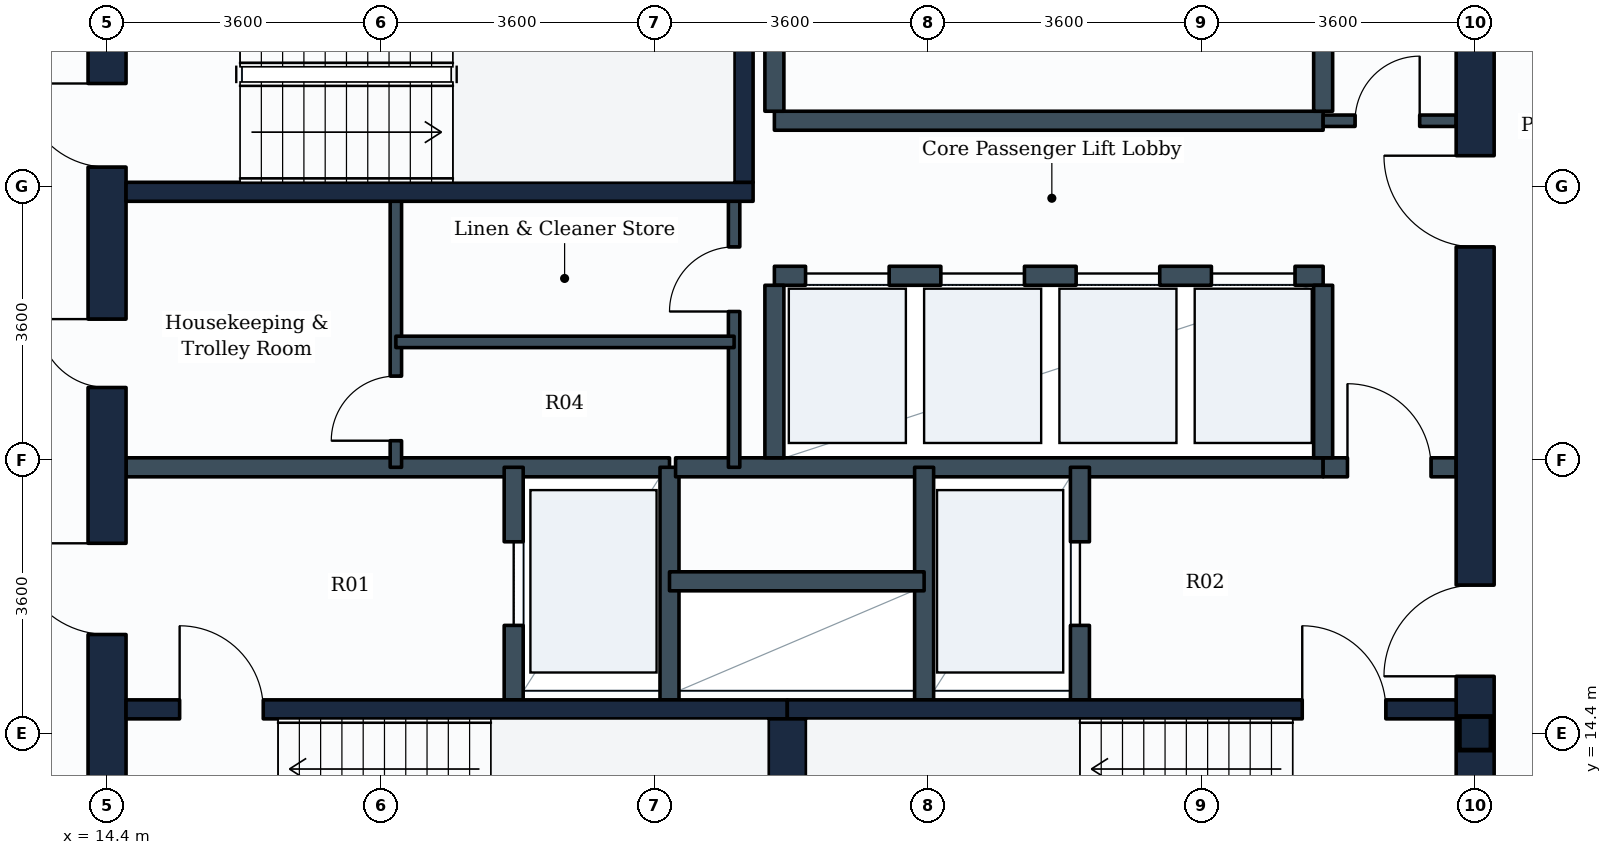
"""IFC4 building model, lengths in metres.
Left out: names, types, materials, properties, quantities, classifications, styles, units other than length and angle.
Written with IfcOpenShell. Run it as: python <this file> out.ifc"""

import sys

from ifc_helpers import new_model, si_unit, direction, frame, frame_2d, origin, origin_2d, place, context, subcontext, project, spatial, rectangle, i_section, extrude, element, fill, save


model = new_model("IFC4")
c1 = context("Model", 3, precision=1e-05, world=origin(), true_north=direction((0.0, 1.0)))
c2 = subcontext(c1, "Body", "Model", "MODEL_VIEW")
j1 = project(units=[si_unit("LENGTHUNIT", "METRE"), si_unit("PLANEANGLEUNIT", "RADIAN")], contexts=[c1])
p1 = place(None, origin())
s1 = spatial("IfcSite", under=j1, at=p1, CompositionType="ELEMENT")
p2 = place(p1, origin())
s2 = spatial("IfcBuilding", under=s1, at=p2, CompositionType="ELEMENT")
p3 = place(p2, frame((0.0, 0.0, 197.6)))
s3 = spatial("IfcBuildingStorey", under=s2, at=p3, CompositionType="ELEMENT", Elevation=197.6)
p4 = place(p3, frame((32.4, 14.4, 0.0), z_axis=(0.0, 0.0, 1.0), x_axis=(1.0, 0.0, 0.0)))
e1 = element("IfcColumn", 1, at=p4, inside=s3, PredefinedType="COLUMN", context=c2, shape_type="SweptSolid", body=[
    extrude(i_section(OverallWidth=0.416, OverallDepth=0.442, WebThickness=0.025, FlangeThickness=0.041, FilletRadius=0.015, at=origin_2d()), origin(), (0.0, 0.0, 1.0), 3.8),
])
p5 = place(p3, frame((14.4, 10.8, 0.0), z_axis=(0.0, 0.0, 1.0), x_axis=(0.0, 1.0, 0.0)))
e2 = element("IfcWall", 2, at=p5, inside=s3, PredefinedType="SHEAR", context=c2, shape_type="SweptSolid", body=[
    extrude(rectangle(XDim=14.4, YDim=0.5, at=frame_2d((7.2, 0.0))), origin(), (0.0, 0.0, 1.0), 3.55),
])
p6 = place(p5, frame((11.05, 0.0, 0.0)))
e3 = element("IfcOpeningElement", 3, at=p6, cuts=e2, PredefinedType="OPENING", context=c2, shape_type="SweptSolid", body=[
    extrude(rectangle(XDim=1.1, YDim=2.1, at=frame_2d((0.55, 1.05))), frame((0.0, 0.26, 0.0), z_axis=(0.0, -1.0, 0.0), x_axis=(1.0, 0.0, 0.0)), (0.0, 0.0, 1.0), 0.52),
])
p7 = place(p5, frame((4.9, 0.0, 0.0)))
e4 = element("IfcOpeningElement", 4, at=p7, cuts=e2, PredefinedType="OPENING", context=c2, shape_type="SweptSolid", body=[
    extrude(rectangle(XDim=1.2, YDim=2.1, at=frame_2d((0.6, 1.05))), frame((0.0, 0.26, 0.0), z_axis=(0.0, -1.0, 0.0), x_axis=(1.0, 0.0, 0.0)), (0.0, 0.0, 1.0), 0.52),
])
p8 = place(p5, frame((8.15, 0.0, 0.0)))
e5 = element("IfcOpeningElement", 5, at=p8, cuts=e2, PredefinedType="OPENING", context=c2, shape_type="SweptSolid", body=[
    extrude(rectangle(XDim=0.9, YDim=2.1, at=frame_2d((0.45, 1.05))), frame((0.0, 0.26, 0.0), z_axis=(0.0, -1.0, 0.0), x_axis=(1.0, 0.0, 0.0)), (0.0, 0.0, 1.0), 0.52),
])
p9 = place(p3, frame((32.4, 10.8, 0.0), z_axis=(0.0, 0.0, 1.0), x_axis=(0.0, 1.0, 0.0)))
e6 = element("IfcWall", 6, at=p9, inside=s3, PredefinedType="SHEAR", context=c2, shape_type="SweptSolid", body=[
    extrude(rectangle(XDim=14.4, YDim=0.5, at=frame_2d((7.2, 0.0))), origin(), (0.0, 0.0, 1.0), 3.55),
])
p10 = place(p9, frame((4.35, 0.0, 0.0)))
e7 = element("IfcOpeningElement", 7, at=p10, cuts=e6, PredefinedType="OPENING", context=c2, shape_type="SweptSolid", body=[
    extrude(rectangle(XDim=1.2, YDim=2.1, at=frame_2d((0.6, 1.05))), frame((0.0, 0.26, 0.0), z_axis=(0.0, -1.0, 0.0), x_axis=(1.0, 0.0, 0.0)), (0.0, 0.0, 1.0), 0.52),
])
p11 = place(p9, frame((10.0, 0.0, 0.0)))
e8 = element("IfcOpeningElement", 8, at=p11, cuts=e6, PredefinedType="OPENING", context=c2, shape_type="SweptSolid", body=[
    extrude(rectangle(XDim=1.2, YDim=2.1, at=frame_2d((0.6, 1.05))), frame((0.0, 0.26, 0.0), z_axis=(0.0, -1.0, 0.0), x_axis=(1.0, 0.0, 0.0)), (0.0, 0.0, 1.0), 0.52),
])
p12 = place(p3, frame((14.65, 14.715, 0.0), z_axis=(0.0, 0.0, 1.0), x_axis=(1.0, 0.0, 0.0)))
e9 = element("IfcWall", 9, at=p12, inside=s3, PredefinedType="SHEAR", context=c2, shape_type="SweptSolid", body=[
    extrude(rectangle(XDim=8.7, YDim=0.25, at=frame_2d((4.35, 0.0))), origin(), (0.0, 0.0, 1.0), 3.55),
])
p13 = place(p12, frame((0.705, 0.0, 0.0)))
e10 = element("IfcOpeningElement", 10, at=p13, cuts=e9, PredefinedType="OPENING", context=c2, shape_type="SweptSolid", body=[
    extrude(rectangle(XDim=1.1, YDim=2.1, at=frame_2d((0.55, 1.05))), frame((0.0, 0.135, 0.0), z_axis=(0.0, -1.0, 0.0), x_axis=(1.0, 0.0, 0.0)), (0.0, 0.0, 1.0), 0.27),
])
p14 = place(p3, frame((23.35, 14.715, 0.0), z_axis=(0.0, 0.0, 1.0), x_axis=(1.0, 0.0, 0.0)))
e11 = element("IfcWall", 11, at=p14, inside=s3, PredefinedType="SHEAR", context=c2, shape_type="SweptSolid", body=[
    extrude(rectangle(XDim=8.8, YDim=0.25, at=frame_2d((4.4, 0.0))), origin(), (0.0, 0.0, 1.0), 3.55),
])
p15 = place(p14, frame((6.775, 0.0, 0.0)))
e12 = element("IfcOpeningElement", 12, at=p15, cuts=e11, PredefinedType="OPENING", context=c2, shape_type="SweptSolid", body=[
    extrude(rectangle(XDim=1.1, YDim=2.1, at=frame_2d((0.55, 1.05))), frame((0.0, 0.135, 0.0), z_axis=(0.0, -1.0, 0.0), x_axis=(1.0, 0.0, 0.0)), (0.0, 0.0, 1.0), 0.27),
])
p16 = place(p3, frame((23.35, 11.75, 0.0), z_axis=(0.0, 0.0, 1.0), x_axis=(0.0, 1.0, 0.0)))
e13 = element("IfcWall", 13, at=p16, inside=s3, PredefinedType="SHEAR", context=c2, shape_type="SweptSolid", body=[
    extrude(rectangle(XDim=2.84, YDim=0.5, at=frame_2d((1.42, 0.0))), origin(), (0.0, 0.0, 1.0), 3.55),
])
p17 = place(p3, frame((14.65, 21.525, 0.0), z_axis=(0.0, 0.0, 1.0), x_axis=(1.0, 0.0, 0.0)))
e14 = element("IfcWall", 14, at=p17, inside=s3, PredefinedType="SHEAR", context=c2, shape_type="SweptSolid", body=[
    extrude(rectangle(XDim=8.25, YDim=0.25, at=frame_2d((4.125, 0.0))), origin(), (0.0, 0.0, 1.0), 3.55),
])
p18 = place(p3, frame((22.775, 21.65, 0.0), z_axis=(0.0, 0.0, 1.0), x_axis=(0.0, 1.0, 0.0)))
e15 = element("IfcWall", 15, at=p18, inside=s3, PredefinedType="SHEAR", context=c2, shape_type="SweptSolid", body=[
    extrude(rectangle(XDim=2.84, YDim=0.25, at=frame_2d((1.42, 0.0))), origin(), (0.0, 0.0, 1.0), 3.55),
])
p19 = place(p3, frame((14.65, 17.9, 0.0), z_axis=(0.0, 0.0, 1.0), x_axis=(1.0, 0.0, 0.0)))
e16 = element("IfcWall", 16, at=p19, inside=s3, PredefinedType="PARTITIONING", context=c2, shape_type="SweptSolid", body=[
    extrude(rectangle(XDim=7.15, YDim=0.25, at=frame_2d((3.575, 0.0))), origin(), (0.0, 0.0, 1.0), 3.535),
])
p20 = place(p3, frame((19.75, 14.84, 0.0), z_axis=(0.0, 0.0, 1.0), x_axis=(0.0, 1.0, 0.0)))
e17 = element("IfcWall", 17, at=p20, inside=s3, PredefinedType="PARTITIONING", context=c2, shape_type="SweptSolid", body=[
    extrude(rectangle(XDim=3.06, YDim=0.25, at=frame_2d((1.53, 0.0))), origin(), (0.0, 0.0, 1.0), 3.535),
])
p21 = place(p20, frame((0.98, 0.0, 0.0)))
e18 = element("IfcOpeningElement", 18, at=p21, cuts=e17, PredefinedType="OPENING", context=c2, shape_type="SweptSolid", body=[
    extrude(rectangle(XDim=1.1, YDim=2.1, at=frame_2d((0.55, 1.05))), frame((0.0, 0.135, 0.0), z_axis=(0.0, -1.0, 0.0), x_axis=(1.0, 0.0, 0.0)), (0.0, 0.0, 1.0), 0.27),
])
p22 = place(p3, frame((21.8, 14.84, 0.0), z_axis=(0.0, 0.0, 1.0), x_axis=(0.0, 1.0, 0.0)))
e19 = element("IfcWall", 19, at=p22, inside=s3, PredefinedType="PARTITIONING", context=c2, shape_type="SweptSolid", body=[
    extrude(rectangle(XDim=3.06, YDim=0.25, at=frame_2d((1.53, 0.0))), origin(), (0.0, 0.0, 1.0), 3.535),
])
p23 = place(p3, frame((21.88, 17.9, 0.0), z_axis=(0.0, 0.0, 1.0), x_axis=(1.0, 0.0, 0.0)))
e20 = element("IfcWall", 20, at=p23, inside=s3, PredefinedType="PARTITIONING", context=c2, shape_type="SweptSolid", body=[
    extrude(rectangle(XDim=8.52, YDim=0.25, at=frame_2d((4.26, 0.0))), origin(), (0.0, 0.0, 1.0), 3.535),
])
p24 = place(p3, frame((30.4, 17.9, 0.0), z_axis=(0.0, 0.0, 1.0), x_axis=(1.0, 0.0, 0.0)))
e21 = element("IfcWall", 21, at=p24, inside=s3, PredefinedType="PARTITIONING", context=c2, shape_type="SweptSolid", body=[
    extrude(rectangle(XDim=1.75, YDim=0.25, at=frame_2d((0.875, 0.0))), origin(), (0.0, 0.0, 1.0), 3.535),
])
p25 = place(p24, frame((0.32, 0.0, 0.0)))
e22 = element("IfcOpeningElement", 22, at=p25, cuts=e21, PredefinedType="OPENING", context=c2, shape_type="SweptSolid", body=[
    extrude(rectangle(XDim=1.1, YDim=2.1, at=frame_2d((0.55, 1.05))), frame((0.0, 0.135, 0.0), z_axis=(0.0, -1.0, 0.0), x_axis=(1.0, 0.0, 0.0)), (0.0, 0.0, 1.0), 0.27),
])
p26 = place(p3, frame((25.15, 14.84, 0.0), z_axis=(0.0, 0.0, 1.0), x_axis=(0.0, 1.0, 0.0)))
e23 = element("IfcWall", 23, at=p26, inside=s3, PredefinedType="PARTITIONING", context=c2, shape_type="SweptSolid", body=[
    extrude(rectangle(XDim=3.06, YDim=0.25, at=frame_2d((1.53, 0.0))), origin(), (0.0, 0.0, 1.0), 3.535),
])
p27 = place(p3, frame((27.2, 14.84, 0.0), z_axis=(0.0, 0.0, 1.0), x_axis=(0.0, 1.0, 0.0)))
e24 = element("IfcWall", 24, at=p27, inside=s3, PredefinedType="PARTITIONING", context=c2, shape_type="SweptSolid", body=[
    extrude(rectangle(XDim=3.06, YDim=0.25, at=frame_2d((1.53, 0.0))), origin(), (0.0, 0.0, 1.0), 3.535),
])
p28 = place(p27, frame((0.98, 0.0, 0.0)))
e25 = element("IfcOpeningElement", 25, at=p28, cuts=e24, PredefinedType="OPENING", context=c2, shape_type="SweptSolid", body=[
    extrude(rectangle(XDim=1.1, YDim=2.1, at=frame_2d((0.55, 1.05))), frame((0.0, 0.135, 0.0), z_axis=(0.0, -1.0, 0.0), x_axis=(1.0, 0.0, 0.0)), (0.0, 0.0, 1.0), 0.27),
])
p29 = place(p3, frame((21.8, 16.4, 0.0), z_axis=(0.0, 0.0, 1.0), x_axis=(1.0, 0.0, 0.0)))
e26 = element("IfcWall", 26, at=p29, inside=s3, PredefinedType="PARTITIONING", context=c2, shape_type="SweptSolid", body=[
    extrude(rectangle(XDim=3.35, YDim=0.25, at=frame_2d((1.675, 0.0))), origin(), (0.0, 0.0, 1.0), 3.535),
])
p30 = place(p3, frame((23.18, 20.42, 0.0), z_axis=(0.0, 0.0, 1.0), x_axis=(1.0, 0.0, 0.0)))
e27 = element("IfcWall", 27, at=p30, inside=s3, PredefinedType="PARTITIONING", context=c2, shape_type="SweptSolid", body=[
    extrude(rectangle(XDim=7.22, YDim=0.25, at=frame_2d((3.61, 0.0))), origin(), (0.0, 0.0, 1.0), 3.535),
])
p31 = place(p30, frame((0.41, 0.0, 0.0)))
e28 = element("IfcOpeningElement", 28, at=p31, cuts=e27, PredefinedType="OPENING", context=c2, shape_type="SweptSolid", body=[
    extrude(rectangle(XDim=1.1, YDim=2.1, at=frame_2d((0.55, 1.05))), frame((0.0, 0.135, 0.0), z_axis=(0.0, -1.0, 0.0), x_axis=(1.0, 0.0, 0.0)), (0.0, 0.0, 1.0), 0.27),
])
p32 = place(p30, frame((2.19, 0.0, 0.0)))
e29 = element("IfcOpeningElement", 29, at=p32, cuts=e27, PredefinedType="OPENING", context=c2, shape_type="SweptSolid", body=[
    extrude(rectangle(XDim=1.1, YDim=2.1, at=frame_2d((0.55, 1.05))), frame((0.0, 0.135, 0.0), z_axis=(0.0, -1.0, 0.0), x_axis=(1.0, 0.0, 0.0)), (0.0, 0.0, 1.0), 0.27),
])
p33 = place(p30, frame((3.97, 0.0, 0.0)))
e30 = element("IfcOpeningElement", 30, at=p33, cuts=e27, PredefinedType="OPENING", context=c2, shape_type="SweptSolid", body=[
    extrude(rectangle(XDim=1.1, YDim=2.1, at=frame_2d((0.55, 1.05))), frame((0.0, 0.135, 0.0), z_axis=(0.0, -1.0, 0.0), x_axis=(1.0, 0.0, 0.0)), (0.0, 0.0, 1.0), 0.27),
])
p34 = place(p30, frame((5.75, 0.0, 0.0)))
e31 = element("IfcOpeningElement", 31, at=p34, cuts=e27, PredefinedType="OPENING", context=c2, shape_type="SweptSolid", body=[
    extrude(rectangle(XDim=1.1, YDim=2.1, at=frame_2d((0.55, 1.05))), frame((0.0, 0.135, 0.0), z_axis=(0.0, -1.0, 0.0), x_axis=(1.0, 0.0, 0.0)), (0.0, 0.0, 1.0), 0.27),
])
for number, where, z_axis, x_axis in (
    (32, (23.18, 18.025, 0.0), (0.0, 0.0, 1.0), (0.0, 1.0, 0.0)),
    (33, (30.4, 18.025, 0.0), (0.0, 0.0, 1.0), (0.0, 1.0, 0.0)),
):
    element("IfcWall", number, at=place(p3, frame(where, z_axis=z_axis, x_axis=x_axis)), inside=s3, PredefinedType="PARTITIONING", context=c2, shape_type="SweptSolid", body=[
        extrude(rectangle(XDim=2.27, YDim=0.25, at=frame_2d((1.135, 0.0))), origin(), (0.0, 0.0, 1.0), 3.535),
    ])
p35 = place(p3, frame((23.18, 22.46, 0.0), z_axis=(0.0, 0.0, 1.0), x_axis=(1.0, 0.0, 0.0)))
e34 = element("IfcWall", 34, at=p35, inside=s3, PredefinedType="PARTITIONING", context=c2, shape_type="SweptSolid", body=[
    extrude(rectangle(XDim=7.22, YDim=0.25, at=frame_2d((3.61, 0.0))), origin(), (0.0, 0.0, 1.0), 3.535),
])
for number, where, z_axis, x_axis in (
    (35, (23.18, 22.585, 0.0), (0.0, 0.0, 1.0), (0.0, 1.0, 0.0)),
    (36, (30.4, 22.585, 0.0), (0.0, 0.0, 1.0), (0.0, 1.0, 0.0)),
):
    element("IfcWall", number, at=place(p3, frame(where, z_axis=z_axis, x_axis=x_axis)), inside=s3, PredefinedType="PARTITIONING", context=c2, shape_type="SweptSolid", body=[
        extrude(rectangle(XDim=2.315, YDim=0.25, at=frame_2d((1.157, 0.0))), origin(), (0.0, 0.0, 1.0), 3.535),
    ])
p36 = place(p3, frame((22.65, 17.9, 0.0), z_axis=(0.0, 0.0, 1.0), x_axis=(0.0, 1.0, 0.0)))
e37 = element("IfcWall", 37, at=p36, inside=s3, PredefinedType="PARTITIONING", context=c2, shape_type="SweptSolid", body=[
    extrude(rectangle(XDim=3.625, YDim=0.15, at=frame_2d((1.812, 0.0))), origin(), (0.0, 0.0, 1.0), 3.535),
])
p37 = place(p36, frame((2.05, 0.0, 0.0)))
e38 = element("IfcOpeningElement", 38, at=p37, cuts=e37, PredefinedType="OPENING", context=c2, shape_type="SweptSolid", body=[
    extrude(rectangle(XDim=0.85, YDim=2.1, at=frame_2d((0.425, 1.05))), frame((0.0, 0.085, 0.0), z_axis=(0.0, -1.0, 0.0), x_axis=(1.0, 0.0, 0.0)), (0.0, 0.0, 1.0), 0.17),
])
p38 = place(p3, frame((18.2, 17.9, 0.0), z_axis=(0.0, 0.0, 1.0), x_axis=(0.0, 1.0, 0.0)))
e39 = element("IfcWall", 39, at=p38, inside=s3, PredefinedType="PARTITIONING", context=c2, shape_type="SweptSolid", body=[
    extrude(rectangle(XDim=3.625, YDim=0.15, at=frame_2d((1.812, 0.0))), origin(), (0.0, 0.0, 1.0), 3.535),
])
p39 = place(p38, frame((0.35, 0.0, 0.0)))
e40 = element("IfcOpeningElement", 40, at=p39, cuts=e39, PredefinedType="OPENING", context=c2, shape_type="SweptSolid", body=[
    extrude(rectangle(XDim=0.85, YDim=2.1, at=frame_2d((0.425, 1.05))), frame((0.0, 0.085, 0.0), z_axis=(0.0, -1.0, 0.0), x_axis=(1.0, 0.0, 0.0)), (0.0, 0.0, 1.0), 0.17),
])
p40 = place(p3, frame((18.2, 19.55, 0.0), z_axis=(0.0, 0.0, 1.0), x_axis=(1.0, 0.0, 0.0)))
e41 = element("IfcWall", 41, at=p40, inside=s3, PredefinedType="PARTITIONING", context=c2, shape_type="SweptSolid", body=[
    extrude(rectangle(XDim=4.45, YDim=0.15, at=frame_2d((2.225, 0.0))), origin(), (0.0, 0.0, 1.0), 3.535),
])
p41 = place(p3, frame((30.4, 22.46, 0.0), z_axis=(0.0, 0.0, 1.0), x_axis=(1.0, 0.0, 0.0)))
e42 = element("IfcWall", 42, at=p41, inside=s3, PredefinedType="PARTITIONING", context=c2, shape_type="SweptSolid", body=[
    extrude(rectangle(XDim=1.75, YDim=0.15, at=frame_2d((0.875, 0.0))), origin(), (0.0, 0.0, 1.0), 3.535),
])
p42 = place(p41, frame((0.42, 0.0, 0.0)))
e43 = element("IfcOpeningElement", 43, at=p42, cuts=e42, PredefinedType="OPENING", context=c2, shape_type="SweptSolid", body=[
    extrude(rectangle(XDim=0.85, YDim=2.1, at=frame_2d((0.425, 1.05))), frame((0.0, 0.085, 0.0), z_axis=(0.0, -1.0, 0.0), x_axis=(1.0, 0.0, 0.0)), (0.0, 0.0, 1.0), 0.17),
])
p43 = place(p13, origin())
e44 = element("IfcDoor", 44, at=p43, inside=s3, OperationType="SINGLE_SWING_LEFT", PredefinedType="DOOR", context=c2, shape_type="SweptSolid", body=[
    extrude(rectangle(XDim=1.1, YDim=2.1, at=frame_2d((0.55, 1.05))), frame((0.0, 0.025, 0.0), z_axis=(0.0, -1.0, 0.0), x_axis=(1.0, 0.0, 0.0)), (0.0, 0.0, 1.0), 0.05),
])
fill(e10, e44)
p44 = place(p15, origin())
e45 = element("IfcDoor", 45, at=p44, inside=s3, OperationType="SINGLE_SWING_LEFT", PredefinedType="DOOR", context=c2, shape_type="SweptSolid", body=[
    extrude(rectangle(XDim=1.1, YDim=2.1, at=frame_2d((0.55, 1.05))), frame((0.0, 0.025, 0.0), z_axis=(0.0, -1.0, 0.0), x_axis=(1.0, 0.0, 0.0)), (0.0, 0.0, 1.0), 0.05),
])
fill(e12, e45)
p45 = place(p6, origin())
e46 = element("IfcDoor", 46, at=p45, inside=s3, OperationType="SINGLE_SWING_RIGHT", PredefinedType="DOOR", context=c2, shape_type="SweptSolid", body=[
    extrude(rectangle(XDim=1.1, YDim=2.1, at=frame_2d((0.55, 1.05))), frame((0.0, 0.025, 0.0), z_axis=(0.0, -1.0, 0.0), x_axis=(1.0, 0.0, 0.0)), (0.0, 0.0, 1.0), 0.05),
])
fill(e3, e46)
p46 = place(p21, origin())
e47 = element("IfcDoor", 47, at=p46, inside=s3, OperationType="SLIDING_TO_LEFT", PredefinedType="DOOR", context=c2, shape_type="SweptSolid", body=[
    extrude(rectangle(XDim=1.1, YDim=2.1, at=frame_2d((0.55, 1.05))), frame((0.0, 0.025, 0.0), z_axis=(0.0, -1.0, 0.0), x_axis=(1.0, 0.0, 0.0)), (0.0, 0.0, 1.0), 0.05),
])
fill(e18, e47)
p47 = place(p28, origin())
e48 = element("IfcDoor", 48, at=p47, inside=s3, OperationType="SLIDING_TO_LEFT", PredefinedType="DOOR", context=c2, shape_type="SweptSolid", body=[
    extrude(rectangle(XDim=1.1, YDim=2.1, at=frame_2d((0.55, 1.05))), frame((0.0, 0.025, 0.0), z_axis=(0.0, -1.0, 0.0), x_axis=(1.0, 0.0, 0.0)), (0.0, 0.0, 1.0), 0.05),
])
fill(e25, e48)
p48 = place(p7, origin())
e49 = element("IfcDoor", 49, at=p48, inside=s3, OperationType="SINGLE_SWING_RIGHT", PredefinedType="DOOR", context=c2, shape_type="SweptSolid", body=[
    extrude(rectangle(XDim=1.2, YDim=2.1, at=frame_2d((0.6, 1.05))), frame((0.0, 0.025, 0.0), z_axis=(0.0, -1.0, 0.0), x_axis=(1.0, 0.0, 0.0)), (0.0, 0.0, 1.0), 0.05),
])
fill(e4, e49)
p49 = place(p10, origin())
e50 = element("IfcDoor", 50, at=p49, inside=s3, OperationType="SINGLE_SWING_LEFT", PredefinedType="DOOR", context=c2, shape_type="SweptSolid", body=[
    extrude(rectangle(XDim=1.2, YDim=2.1, at=frame_2d((0.6, 1.05))), frame((0.0, 0.025, 0.0), z_axis=(0.0, -1.0, 0.0), x_axis=(1.0, 0.0, 0.0)), (0.0, 0.0, 1.0), 0.05),
])
fill(e7, e50)
p50 = place(p25, origin())
e51 = element("IfcDoor", 51, at=p50, inside=s3, OperationType="SINGLE_SWING_LEFT", PredefinedType="DOOR", context=c2, shape_type="SweptSolid", body=[
    extrude(rectangle(XDim=1.1, YDim=2.1, at=frame_2d((0.55, 1.05))), frame((0.0, 0.025, 0.0), z_axis=(0.0, -1.0, 0.0), x_axis=(1.0, 0.0, 0.0)), (0.0, 0.0, 1.0), 0.05),
])
fill(e22, e51)
p51 = place(p31, origin())
e52 = element("IfcDoor", 52, at=p51, inside=s3, OperationType="SLIDING_TO_LEFT", PredefinedType="DOOR", context=c2, shape_type="SweptSolid", body=[
    extrude(rectangle(XDim=1.1, YDim=2.1, at=frame_2d((0.55, 1.05))), frame((0.0, 0.025, 0.0), z_axis=(0.0, -1.0, 0.0), x_axis=(1.0, 0.0, 0.0)), (0.0, 0.0, 1.0), 0.05),
])
fill(e28, e52)
p52 = place(p32, origin())
e53 = element("IfcDoor", 53, at=p52, inside=s3, OperationType="SLIDING_TO_LEFT", PredefinedType="DOOR", context=c2, shape_type="SweptSolid", body=[
    extrude(rectangle(XDim=1.1, YDim=2.1, at=frame_2d((0.55, 1.05))), frame((0.0, 0.025, 0.0), z_axis=(0.0, -1.0, 0.0), x_axis=(1.0, 0.0, 0.0)), (0.0, 0.0, 1.0), 0.05),
])
fill(e29, e53)
p53 = place(p33, origin())
e54 = element("IfcDoor", 54, at=p53, inside=s3, OperationType="SLIDING_TO_LEFT", PredefinedType="DOOR", context=c2, shape_type="SweptSolid", body=[
    extrude(rectangle(XDim=1.1, YDim=2.1, at=frame_2d((0.55, 1.05))), frame((0.0, 0.025, 0.0), z_axis=(0.0, -1.0, 0.0), x_axis=(1.0, 0.0, 0.0)), (0.0, 0.0, 1.0), 0.05),
])
fill(e30, e54)
p54 = place(p34, origin())
e55 = element("IfcDoor", 55, at=p54, inside=s3, OperationType="SLIDING_TO_LEFT", PredefinedType="DOOR", context=c2, shape_type="SweptSolid", body=[
    extrude(rectangle(XDim=1.1, YDim=2.1, at=frame_2d((0.55, 1.05))), frame((0.0, 0.025, 0.0), z_axis=(0.0, -1.0, 0.0), x_axis=(1.0, 0.0, 0.0)), (0.0, 0.0, 1.0), 0.05),
])
fill(e31, e55)
p55 = place(p11, origin())
e56 = element("IfcDoor", 56, at=p55, inside=s3, OperationType="SINGLE_SWING_RIGHT", PredefinedType="DOOR", context=c2, shape_type="SweptSolid", body=[
    extrude(rectangle(XDim=1.2, YDim=2.1, at=frame_2d((0.6, 1.05))), frame((0.0, 0.025, 0.0), z_axis=(0.0, -1.0, 0.0), x_axis=(1.0, 0.0, 0.0)), (0.0, 0.0, 1.0), 0.05),
])
fill(e8, e56)
p56 = place(p8, origin())
e57 = element("IfcDoor", 57, at=p56, inside=s3, OperationType="SINGLE_SWING_RIGHT", PredefinedType="DOOR", context=c2, shape_type="SweptSolid", body=[
    extrude(rectangle(XDim=0.9, YDim=2.1, at=frame_2d((0.45, 1.05))), frame((0.0, 0.025, 0.0), z_axis=(0.0, -1.0, 0.0), x_axis=(1.0, 0.0, 0.0)), (0.0, 0.0, 1.0), 0.05),
])
fill(e5, e57)
p57 = place(p39, origin())
e58 = element("IfcDoor", 58, at=p57, inside=s3, OperationType="SINGLE_SWING_LEFT", PredefinedType="DOOR", context=c2, shape_type="SweptSolid", body=[
    extrude(rectangle(XDim=0.85, YDim=2.1, at=frame_2d((0.425, 1.05))), frame((0.0, 0.025, 0.0), z_axis=(0.0, -1.0, 0.0), x_axis=(1.0, 0.0, 0.0)), (0.0, 0.0, 1.0), 0.05),
])
fill(e40, e58)
p58 = place(p37, origin())
e59 = element("IfcDoor", 59, at=p58, inside=s3, OperationType="SINGLE_SWING_LEFT", PredefinedType="DOOR", context=c2, shape_type="SweptSolid", body=[
    extrude(rectangle(XDim=0.85, YDim=2.1, at=frame_2d((0.425, 1.05))), frame((0.0, 0.025, 0.0), z_axis=(0.0, -1.0, 0.0), x_axis=(1.0, 0.0, 0.0)), (0.0, 0.0, 1.0), 0.05),
])
fill(e38, e59)
p59 = place(p42, origin())
e60 = element("IfcDoor", 60, at=p59, inside=s3, OperationType="SINGLE_SWING_RIGHT", PredefinedType="DOOR", context=c2, shape_type="SweptSolid", body=[
    extrude(rectangle(XDim=0.85, YDim=2.1, at=frame_2d((0.425, 1.05))), frame((0.0, 0.025, 0.0), z_axis=(0.0, -1.0, 0.0), x_axis=(1.0, 0.0, 0.0)), (0.0, 0.0, 1.0), 0.05),
])
fill(e43, e60)
save(model, sys.argv[1])
